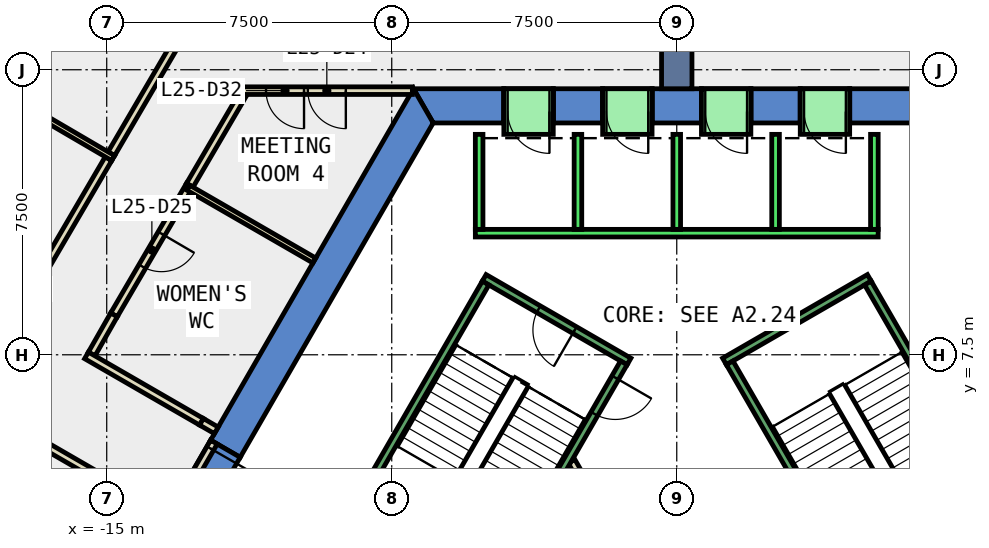
"""IFC4 building model, lengths in metres.
Left out: names, types, materials, properties, quantities, classifications, styles, units other than length and angle.
Written with IfcOpenShell. Run it as: python <this file> out.ifc"""

import sys

from ifc_helpers import new_model, si_unit, direction, frame, frame_2d, origin, place, context, subcontext, project, spatial, polyline, rectangle, outline, extrude, element, fill, save


model = new_model("IFC4")
c1 = context("Model", 3, precision=1e-05, world=origin(), true_north=direction((0.0, 1.0)))
c2 = subcontext(c1, "Body", "Model", "MODEL_VIEW")
j1 = project(units=[si_unit("LENGTHUNIT", "METRE"), si_unit("PLANEANGLEUNIT", "RADIAN")], contexts=[c1])
p1 = place(None, origin())
s1 = spatial("IfcSite", under=j1, at=p1, CompositionType="ELEMENT")
p2 = place(p1, origin())
s2 = spatial("IfcBuilding", under=s1, at=p2, CompositionType="ELEMENT")
p3 = place(p2, frame((0.0, 0.0, 116.0)))
s3 = spatial("IfcBuildingStorey", under=s2, at=p3, CompositionType="ELEMENT", Elevation=116.0)
p4 = place(p3, frame((0.0, 0.0, -0.4)))
e1 = element("IfcWall", 1, at=p4, inside=s3, PredefinedType="SHEAR", context=c2, shape_type="SweptSolid", body=[
    extrude(outline(polyline([(4.55, 14.5), (4.55, 13.6), (6.409, 13.6), (6.928, 14.5), (4.55, 14.5)])), origin(), (0.0, 0.0, 1.0), 4.2),
])
p5 = place(p3, frame((0.0, 0.0, -0.4)))
e2 = element("IfcWall", 2, at=p5, inside=s3, PredefinedType="SHEAR", context=c2, shape_type="SweptSolid", body=[
    extrude(outline(polyline([(1.95, 14.5), (1.95, 13.6), (3.25, 13.6), (3.25, 14.5), (1.95, 14.5)])), origin(), (0.0, 0.0, 1.0), 4.2),
])
p6 = place(p3, frame((0.0, 0.0, -0.4)))
e3 = element("IfcWall", 3, at=p6, inside=s3, PredefinedType="SHEAR", context=c2, shape_type="SweptSolid", body=[
    extrude(outline(polyline([(-0.65, 14.5), (-0.65, 13.6), (0.65, 13.6), (0.65, 14.5), (-0.65, 14.5)])), origin(), (0.0, 0.0, 1.0), 4.2),
])
p7 = place(p3, frame((0.0, 0.0, -0.4)))
e4 = element("IfcWall", 4, at=p7, inside=s3, PredefinedType="SHEAR", context=c2, shape_type="SweptSolid", body=[
    extrude(outline(polyline([(-3.25, 14.5), (-3.25, 13.6), (-1.95, 13.6), (-1.95, 14.5), (-3.25, 14.5)])), origin(), (0.0, 0.0, 1.0), 4.2),
])
p8 = place(p3, frame((0.0, 0.0, -0.4)))
e5 = element("IfcWall", 5, at=p8, inside=s3, PredefinedType="SHEAR", context=c2, shape_type="SweptSolid", body=[
    extrude(outline(polyline([(-4.55, 13.6), (-4.55, 14.5), (-6.928, 14.5), (-6.409, 13.6), (-4.55, 13.6)])), origin(), (0.0, 0.0, 1.0), 4.2),
])
p9 = place(p3, frame((0.0, 0.0, 3.6)))
e6 = element("IfcWall", 6, at=p9, inside=s3, PredefinedType="SHEAR", context=c2, shape_type="SweptSolid", body=[
    extrude(outline(polyline([(3.25, 14.5), (3.25, 13.6), (4.55, 13.6), (4.55, 14.5), (3.25, 14.5)])), origin(), (0.0, 0.0, 1.0), 0.2),
])
p10 = place(p3, frame((0.0, 0.0, 3.6)))
e7 = element("IfcWall", 7, at=p10, inside=s3, PredefinedType="SHEAR", context=c2, shape_type="SweptSolid", body=[
    extrude(outline(polyline([(0.65, 14.5), (0.65, 13.6), (1.95, 13.6), (1.95, 14.5), (0.65, 14.5)])), origin(), (0.0, 0.0, 1.0), 0.2),
])
p11 = place(p3, frame((0.0, 0.0, 3.6)))
e8 = element("IfcWall", 8, at=p11, inside=s3, PredefinedType="SHEAR", context=c2, shape_type="SweptSolid", body=[
    extrude(outline(polyline([(-1.95, 14.5), (-1.95, 13.6), (-0.65, 13.6), (-0.65, 14.5), (-1.95, 14.5)])), origin(), (0.0, 0.0, 1.0), 0.2),
])
p12 = place(p3, frame((0.0, 0.0, 3.6)))
e9 = element("IfcWall", 9, at=p12, inside=s3, PredefinedType="SHEAR", context=c2, shape_type="SweptSolid", body=[
    extrude(outline(polyline([(-4.55, 14.5), (-4.55, 13.6), (-3.25, 13.6), (-3.25, 14.5), (-4.55, 14.5)])), origin(), (0.0, 0.0, 1.0), 0.2),
])
p13 = place(p3, frame((0.0, 0.0, -0.4)))
e10 = element("IfcWall", 10, at=p13, inside=s3, PredefinedType="SHEAR", context=c2, shape_type="SweptSolid", body=[
    extrude(outline(polyline([(-12.267, 5.252), (-11.488, 4.802), (-6.409, 13.6), (-6.928, 14.5), (-12.267, 5.252)])), origin(), (0.0, 0.0, 1.0), 4.2),
])
p14 = place(p3, frame((0.0, 0.0, 3.6)))
e11 = element("IfcWall", 11, at=p14, inside=s3, PredefinedType="SHEAR", context=c2, shape_type="SweptSolid", body=[
    extrude(outline(polyline([(-13.267, 3.52), (-12.488, 3.07), (-11.488, 4.802), (-12.267, 5.252), (-13.267, 3.52)])), origin(), (0.0, 0.0, 1.0), 0.2),
])
p15 = place(p3, frame((0.0, 14.5, -0.4), z_axis=(0.0, 0.0, 1.0), x_axis=(0.0, 1.0, 0.0)))
e12 = element("IfcWall", 12, at=p15, inside=s3, PredefinedType="SHEAR", context=c2, shape_type="SweptSolid", body=[
    extrude(rectangle(XDim=9.0, YDim=0.8, at=frame_2d((4.5, 0.0))), origin(), (0.0, 0.0, 1.0), 4.2),
])
p16 = place(p3, frame((-11.409, 14.364, 0.0), z_axis=(0.0, 0.0, 1.0), x_axis=(-0.504846343003, -0.863209227219, 0.0)))
e13 = element("IfcWall", 13, at=p16, inside=s3, PredefinedType="PARTITIONING", context=c2, shape_type="SweptSolid", body=[
    extrude(rectangle(XDim=2.785, YDim=0.2, at=frame_2d((1.393, 0.0))), origin(), (0.0, 0.0, 1.0), 3.8),
])
p17 = place(p3, frame((-12.815, 11.96, 0.0), z_axis=(0.0, 0.0, 1.0), x_axis=(-0.5048198861, -0.863224699946, 0.0)))
e14 = element("IfcWall", 14, at=p17, inside=s3, PredefinedType="PARTITIONING", context=c2, shape_type="SweptSolid", body=[
    extrude(rectangle(XDim=3.95, YDim=0.2, at=frame_2d((1.975, 0.0))), origin(), (0.0, 0.0, 1.0), 3.8),
])
p18 = place(p17, frame((1.475, 0.0, 0.0)))
e15 = element("IfcOpeningElement", 15, at=p18, cuts=e14, PredefinedType="OPENING", context=c2, shape_type="SweptSolid", body=[
    extrude(rectangle(XDim=1.0, YDim=2.1, at=frame_2d((0.5, 1.05))), frame((0.0, 0.11, 0.0), z_axis=(0.0, -1.0, 0.0), x_axis=(1.0, 0.0, 0.0)), (0.0, 0.0, 1.0), 0.22),
])
p19 = place(p3, frame((-14.809, 8.55, 0.0), z_axis=(0.0, 0.0, 1.0), x_axis=(-0.495074026382, -0.868850797549, 0.0)))
e16 = element("IfcWall", 16, at=p19, inside=s3, PredefinedType="PARTITIONING", context=c2, shape_type="SweptSolid", body=[
    extrude(rectangle(XDim=1.186, YDim=0.2, at=frame_2d((0.593, 0.0))), origin(), (0.0, 0.0, 1.0), 3.8),
])
p20 = place(p3, frame((-15.532, 7.484, 0.0), z_axis=(0.0, 0.0, 1.0), x_axis=(0.866045954906, -0.499964402723, 0.0)))
e17 = element("IfcWall", 17, at=p20, inside=s3, PredefinedType="PARTITIONING", context=c2, shape_type="SweptSolid", body=[
    extrude(rectangle(XDim=3.494, YDim=0.2, at=frame_2d((1.747, 0.0))), origin(), (0.0, 0.0, 1.0), 3.8),
])
p21 = place(p3, frame((-14.879, 12.789, 0.0), z_axis=(0.0, 0.0, 1.0), x_axis=(0.504763220102, 0.863257836126, 0.0)))
e18 = element("IfcWall", 18, at=p21, inside=s3, PredefinedType="PARTITIONING", context=c2, shape_type="SweptSolid", body=[
    extrude(rectangle(XDim=3.487, YDim=0.2, at=frame_2d((1.743, 0.0))), origin(), (0.0, 0.0, 1.0), 3.8),
])
p22 = place(p3, frame((-16.714, 9.65, 0.0), z_axis=(0.0, 0.0, 1.0), x_axis=(0.504885284202, 0.863186451351, 0.0)))
e19 = element("IfcWall", 19, at=p22, inside=s3, PredefinedType="PARTITIONING", context=c2, shape_type="SweptSolid", body=[
    extrude(rectangle(XDim=3.486, YDim=0.2, at=frame_2d((1.743, 0.0))), origin(), (0.0, 0.0, 1.0), 3.8),
])
p23 = place(p3, frame((-9.537, 9.981, 0.0), z_axis=(0.0, 0.0, 1.0), x_axis=(-0.866068787954, 0.499924848885, 0.0)))
e20 = element("IfcWall", 20, at=p23, inside=s3, PredefinedType="PARTITIONING", context=c2, shape_type="SweptSolid", body=[
    extrude(rectangle(XDim=3.829, YDim=0.15, at=frame_2d((1.914, 0.0))), origin(), (0.0, 0.0, 1.0), 3.8),
])
p24 = place(p3, frame((-6.957, 14.45, 0.0), z_axis=(0.0, 0.0, 1.0), x_axis=(-1.0, 0.0, 0.0)))
e21 = element("IfcWall", 21, at=p24, inside=s3, PredefinedType="PARTITIONING", context=c2, shape_type="SweptSolid", body=[
    extrude(rectangle(XDim=4.502, YDim=0.2, at=frame_2d((2.251, 0.0))), origin(), (0.0, 0.0, 1.0), 3.8),
])
p25 = place(p24, frame((1.751, 0.0, 0.0)))
e22 = element("IfcOpeningElement", 22, at=p25, cuts=e21, PredefinedType="OPENING", context=c2, shape_type="SweptSolid", body=[
    extrude(rectangle(XDim=1.0, YDim=2.1, at=frame_2d((0.5, 1.05))), frame((0.0, 0.11, 0.0), z_axis=(0.0, -1.0, 0.0), x_axis=(1.0, 0.0, 0.0)), (0.0, 0.0, 1.0), 0.22),
])
p26 = place(p24, frame((2.851, 0.0, 0.0)))
e23 = element("IfcOpeningElement", 23, at=p26, cuts=e21, PredefinedType="OPENING", context=c2, shape_type="SweptSolid", body=[
    extrude(rectangle(XDim=1.0, YDim=2.1, at=frame_2d((0.5, 1.05))), frame((0.0, 0.11, 0.0), z_axis=(0.0, -1.0, 0.0), x_axis=(1.0, 0.0, 0.0)), (0.0, 0.0, 1.0), 0.22),
])
p27 = place(p3, frame((-2.771, 4.7, 0.0), z_axis=(0.0, 0.0, 1.0), x_axis=(0.499969479948, -0.866043023828, 0.0)))
e24 = element("IfcWall", 24, at=p27, inside=s3, PredefinedType="PARTITIONING", context=c2, shape_type="SweptSolid", body=[
    extrude(rectangle(XDim=4.99, YDim=0.2, at=frame_2d((2.495, 0.0))), origin(), (0.0, 0.0, 1.0), 3.8),
])
p28 = place(p27, frame((1.945, 0.0, 0.0)))
e25 = element("IfcOpeningElement", 25, at=p28, cuts=e24, PredefinedType="OPENING", context=c2, shape_type="SweptSolid", body=[
    extrude(rectangle(XDim=1.0, YDim=2.1, at=frame_2d((0.5, 1.05))), frame((0.0, 0.11, 0.0), z_axis=(0.0, -1.0, 0.0), x_axis=(1.0, 0.0, 0.0)), (0.0, 0.0, 1.0), 0.22),
])
p29 = place(p3, frame((-14.83, 12.674, 0.0), z_axis=(0.0, 0.0, 1.0), x_axis=(-0.863237916953, 0.504797284794, 0.0)))
e26 = element("IfcWall", 26, at=p29, inside=s3, PredefinedType="PARTITIONING", context=c2, shape_type="SweptSolid", body=[
    extrude(rectangle(XDim=7.7, YDim=0.15, at=frame_2d((3.85, 0.0))), origin(), (0.0, 0.0, 1.0), 3.8),
])
p30 = place(p3, frame((-12.18, 5.202, 0.0), z_axis=(0.0, 0.0, 1.0), x_axis=(-0.50002537861, -0.866010750942, 0.0)))
e27 = element("IfcWall", 27, at=p30, inside=s3, PredefinedType="PARTITIONING", context=c2, shape_type="SweptSolid", body=[
    extrude(rectangle(XDim=2.0, YDim=0.2, at=frame_2d((1.0, 0.0))), origin(), (0.0, 0.0, 1.0), 2.4),
])
p31 = place(p30, frame((0.19, 0.0, 0.0)))
e28 = element("IfcOpeningElement", 28, at=p31, cuts=e27, PredefinedType="OPENING", context=c2, shape_type="SweptSolid", body=[
    extrude(rectangle(XDim=1.8, YDim=2.1, at=frame_2d((0.9, 1.05))), frame((0.0, 0.11, 0.0), z_axis=(0.0, -1.0, 0.0), x_axis=(1.0, 0.0, 0.0)), (0.0, 0.0, 1.0), 0.22),
])
p32 = place(p3, frame((-12.506, 5.737, 0.0), z_axis=(0.0, 0.0, 1.0), x_axis=(0.865624510465, -0.500693725627, 0.0)))
e29 = element("IfcWall", 29, at=p32, inside=s3, PredefinedType="PARTITIONING", context=c2, shape_type="SweptSolid", body=[
    extrude(rectangle(XDim=0.449, YDim=0.2, at=frame_2d((0.225, 0.0))), origin(), (0.0, 0.0, 1.0), 2.4),
])
p33 = place(p3, frame((-13.807, 3.485, 0.0), z_axis=(0.0, 0.0, 1.0), x_axis=(-0.865984597717, 0.500070671522, 0.0)))
e30 = element("IfcWall", 30, at=p33, inside=s3, PredefinedType="PARTITIONING", context=c2, shape_type="SweptSolid", body=[
    extrude(rectangle(XDim=3.479, YDim=0.2, at=frame_2d((1.74, 0.0))), origin(), (0.0, 0.0, 1.0), 3.8),
])
p34 = place(p3, frame((5.3, 10.7, 0.0), z_axis=(0.0, 0.0, 1.0), x_axis=(-1.0, 0.0, 0.0)))
e31 = element("IfcWall", 31, at=p34, inside=s3, PredefinedType="STANDARD", context=c2, shape_type="SweptSolid", body=[
    extrude(rectangle(XDim=10.6, YDim=0.2, at=frame_2d((5.3, 0.0))), origin(), (0.0, 0.0, 1.0), 3.8),
])
for number, where, z_axis, x_axis in (
    (32, (5.2, 10.8, 0.0), (0.0, 0.0, 1.0), (0.0, 1.0, 0.0)),
    (33, (2.6, 10.8, 0.0), (0.0, 0.0, 1.0), (0.0, 1.0, 0.0)),
    (34, (0.0, 10.8, 0.0), (0.0, 0.0, 1.0), (0.0, 1.0, 0.0)),
    (35, (-2.6, 10.8, 0.0), (0.0, 0.0, 1.0), (0.0, 1.0, 0.0)),
    (36, (-5.2, 10.8, 0.0), (0.0, 0.0, 1.0), (0.0, 1.0, 0.0)),
):
    element("IfcWall", number, at=place(p3, frame(where, z_axis=z_axis, x_axis=x_axis)), inside=s3, PredefinedType="STANDARD", context=c2, shape_type="SweptSolid", body=[
        extrude(rectangle(XDim=2.5, YDim=0.2, at=frame_2d((1.25, 0.0))), origin(), (0.0, 0.0, 1.0), 3.8),
    ])
p35 = place(p3, frame((4.55, 13.9, 0.0), z_axis=(0.0, 0.0, 1.0), x_axis=(-1.0, 0.0, 0.0)))
e37 = element("IfcWall", 37, at=p35, inside=s3, PredefinedType="STANDARD", context=c2, shape_type="SweptSolid", body=[
    extrude(rectangle(XDim=1.3, YDim=1.2, at=frame_2d((0.65, 0.0))), origin(), (0.0, 0.0, 1.0), 2.4),
])
p36 = place(p35, frame((0.1, 0.0, 0.0)))
e38 = element("IfcOpeningElement", 38, at=p36, cuts=e37, PredefinedType="OPENING", context=c2, shape_type="SweptSolid", body=[
    extrude(rectangle(XDim=1.1, YDim=2.3, at=frame_2d((0.55, 1.15))), frame((0.0, 0.61, 0.0), z_axis=(0.0, -1.0, 0.0), x_axis=(1.0, 0.0, 0.0)), (0.0, 0.0, 1.0), 1.22),
])
p37 = place(p3, frame((1.95, 13.9, 0.0), z_axis=(0.0, 0.0, 1.0), x_axis=(-1.0, 0.0, 0.0)))
e39 = element("IfcWall", 39, at=p37, inside=s3, PredefinedType="STANDARD", context=c2, shape_type="SweptSolid", body=[
    extrude(rectangle(XDim=1.3, YDim=1.2, at=frame_2d((0.65, 0.0))), origin(), (0.0, 0.0, 1.0), 2.4),
])
p38 = place(p37, frame((0.1, 0.0, 0.0)))
e40 = element("IfcOpeningElement", 40, at=p38, cuts=e39, PredefinedType="OPENING", context=c2, shape_type="SweptSolid", body=[
    extrude(rectangle(XDim=1.1, YDim=2.3, at=frame_2d((0.55, 1.15))), frame((0.0, 0.61, 0.0), z_axis=(0.0, -1.0, 0.0), x_axis=(1.0, 0.0, 0.0)), (0.0, 0.0, 1.0), 1.22),
])
p39 = place(p3, frame((-0.65, 13.9, 0.0), z_axis=(0.0, 0.0, 1.0), x_axis=(-1.0, 0.0, 0.0)))
e41 = element("IfcWall", 41, at=p39, inside=s3, PredefinedType="STANDARD", context=c2, shape_type="SweptSolid", body=[
    extrude(rectangle(XDim=1.3, YDim=1.2, at=frame_2d((0.65, 0.0))), origin(), (0.0, 0.0, 1.0), 2.4),
])
p40 = place(p39, frame((0.1, 0.0, 0.0)))
e42 = element("IfcOpeningElement", 42, at=p40, cuts=e41, PredefinedType="OPENING", context=c2, shape_type="SweptSolid", body=[
    extrude(rectangle(XDim=1.1, YDim=2.3, at=frame_2d((0.55, 1.15))), frame((0.0, 0.61, 0.0), z_axis=(0.0, -1.0, 0.0), x_axis=(1.0, 0.0, 0.0)), (0.0, 0.0, 1.0), 1.22),
])
p41 = place(p3, frame((-3.25, 13.9, 0.0), z_axis=(0.0, 0.0, 1.0), x_axis=(-1.0, 0.0, 0.0)))
e43 = element("IfcWall", 43, at=p41, inside=s3, PredefinedType="STANDARD", context=c2, shape_type="SweptSolid", body=[
    extrude(rectangle(XDim=1.3, YDim=1.2, at=frame_2d((0.65, 0.0))), origin(), (0.0, 0.0, 1.0), 2.4),
])
p42 = place(p41, frame((0.1, 0.0, 0.0)))
e44 = element("IfcOpeningElement", 44, at=p42, cuts=e43, PredefinedType="OPENING", context=c2, shape_type="SweptSolid", body=[
    extrude(rectangle(XDim=1.1, YDim=2.3, at=frame_2d((0.55, 1.15))), frame((0.0, 0.61, 0.0), z_axis=(0.0, -1.0, 0.0), x_axis=(1.0, 0.0, 0.0)), (0.0, 0.0, 1.0), 1.22),
])
p43 = place(p3, frame((1.256, 7.324, 0.0), z_axis=(0.0, 0.0, 1.0), x_axis=(0.866046073146, 0.499964197906, 0.0)))
e45 = element("IfcWall", 45, at=p43, inside=s3, PredefinedType="STANDARD", context=c2, shape_type="SweptSolid", body=[
    extrude(rectangle(XDim=4.4, YDim=0.2, at=frame_2d((2.2, 0.0))), origin(), (0.0, 0.0, 1.0), 3.8),
])
p44 = place(p3, frame((4.843, 1.312, 0.0), z_axis=(0.0, 0.0, 1.0), x_axis=(-0.499963383562, 0.866046543262, 0.0)))
e46 = element("IfcWall", 46, at=p44, inside=s3, PredefinedType="STANDARD", context=c2, shape_type="SweptSolid", body=[
    extrude(rectangle(XDim=6.9, YDim=0.2, at=frame_2d((3.45, 0.0))), origin(), (0.0, 0.0, 1.0), 3.8),
])
p45 = place(p44, frame((0.45, 0.0, 0.0)))
e47 = element("IfcOpeningElement", 47, at=p45, cuts=e46, PredefinedType="OPENING", context=c2, shape_type="SweptSolid", body=[
    extrude(rectangle(XDim=1.1, YDim=2.2, at=frame_2d((0.55, 1.1))), frame((0.0, 0.11, 0.0), z_axis=(0.0, -1.0, 0.0), x_axis=(1.0, 0.0, 0.0)), (0.0, 0.0, 1.0), 0.22),
])
p46 = place(p3, frame((8.48, 3.412, 0.0), z_axis=(0.0, 0.0, 1.0), x_axis=(-0.499978703459, 0.866037698999, 0.0)))
e48 = element("IfcWall", 48, at=p46, inside=s3, PredefinedType="STANDARD", context=c2, shape_type="SweptSolid", body=[
    extrude(rectangle(XDim=6.9, YDim=0.2, at=frame_2d((3.45, 0.0))), origin(), (0.0, 0.0, 1.0), 3.8),
])
p47 = place(p3, frame((-1.256, 7.324, 0.0), z_axis=(0.0, 0.0, 1.0), x_axis=(-0.866046073146, 0.499964197906, 0.0)))
e49 = element("IfcWall", 49, at=p47, inside=s3, PredefinedType="STANDARD", context=c2, shape_type="SweptSolid", body=[
    extrude(rectangle(XDim=4.4, YDim=0.2, at=frame_2d((2.2, 0.0))), origin(), (0.0, 0.0, 1.0), 3.8),
])
p48 = place(p47, frame((1.65, 0.0, 0.0)))
e50 = element("IfcOpeningElement", 50, at=p48, cuts=e49, PredefinedType="OPENING", context=c2, shape_type="SweptSolid", body=[
    extrude(rectangle(XDim=1.1, YDim=2.2, at=frame_2d((0.55, 1.1))), frame((0.0, 0.11, 0.0), z_axis=(0.0, -1.0, 0.0), x_axis=(1.0, 0.0, 0.0)), (0.0, 0.0, 1.0), 0.22),
])
p49 = place(p3, frame((-1.393, 7.288, 0.0), z_axis=(0.0, 0.0, 1.0), x_axis=(-0.499963383562, -0.866046543262, 0.0)))
e51 = element("IfcWall", 51, at=p49, inside=s3, PredefinedType="STANDARD", context=c2, shape_type="SweptSolid", body=[
    extrude(rectangle(XDim=6.9, YDim=0.2, at=frame_2d((3.45, 0.0))), origin(), (0.0, 0.0, 1.0), 3.8),
])
p50 = place(p49, frame((0.45, 0.0, 0.0)))
e52 = element("IfcOpeningElement", 52, at=p50, cuts=e51, PredefinedType="OPENING", context=c2, shape_type="SweptSolid", body=[
    extrude(rectangle(XDim=1.1, YDim=2.2, at=frame_2d((0.55, 1.1))), frame((0.0, 0.11, 0.0), z_axis=(0.0, -1.0, 0.0), x_axis=(1.0, 0.0, 0.0)), (0.0, 0.0, 1.0), 0.22),
])
p51 = place(p3, frame((-5.03, 9.388, 0.0), z_axis=(0.0, 0.0, 1.0), x_axis=(-0.499978703459, -0.866037698999, 0.0)))
e53 = element("IfcWall", 53, at=p51, inside=s3, PredefinedType="STANDARD", context=c2, shape_type="SweptSolid", body=[
    extrude(rectangle(XDim=6.9, YDim=0.2, at=frame_2d((3.45, 0.0))), origin(), (0.0, 0.0, 1.0), 3.8),
])
p52 = place(p25, origin())
e54 = element("IfcDoor", 54, at=p52, inside=s3, OperationType="SINGLE_SWING_LEFT", PredefinedType="DOOR", context=c2, shape_type="SweptSolid", body=[
    extrude(rectangle(XDim=1.0, YDim=2.1, at=frame_2d((0.5, 1.05))), frame((0.0, 0.025, 0.0), z_axis=(0.0, -1.0, 0.0), x_axis=(1.0, 0.0, 0.0)), (0.0, 0.0, 1.0), 0.05),
])
fill(e22, e54)
p53 = place(p18, origin())
e55 = element("IfcDoor", 55, at=p53, inside=s3, OperationType="SINGLE_SWING_RIGHT", PredefinedType="DOOR", context=c2, shape_type="SweptSolid", body=[
    extrude(rectangle(XDim=1.0, YDim=2.1, at=frame_2d((0.5, 1.05))), frame((0.0, 0.025, 0.0), z_axis=(0.0, -1.0, 0.0), x_axis=(1.0, 0.0, 0.0)), (0.0, 0.0, 1.0), 0.05),
])
fill(e15, e55)
p54 = place(p26, origin())
e56 = element("IfcDoor", 56, at=p54, inside=s3, OperationType="SINGLE_SWING_RIGHT", PredefinedType="DOOR", context=c2, shape_type="SweptSolid", body=[
    extrude(rectangle(XDim=1.0, YDim=2.1, at=frame_2d((0.5, 1.05))), frame((0.0, 0.025, 0.0), z_axis=(0.0, -1.0, 0.0), x_axis=(1.0, 0.0, 0.0)), (0.0, 0.0, 1.0), 0.05),
])
fill(e23, e56)
p55 = place(p31, origin())
e57 = element("IfcDoor", 57, at=p55, inside=s3, OperationType="DOUBLE_DOOR_SINGLE_SWING", PredefinedType="DOOR", context=c2, shape_type="SweptSolid", body=[
    extrude(rectangle(XDim=1.8, YDim=2.1, at=frame_2d((0.9, 1.05))), frame((0.0, 0.025, 0.0), z_axis=(0.0, -1.0, 0.0), x_axis=(1.0, 0.0, 0.0)), (0.0, 0.0, 1.0), 0.05),
])
fill(e28, e57)
p56 = place(p36, origin())
e58 = element("IfcDoor", 58, at=p56, inside=s3, OperationType="SLIDING_TO_LEFT", PredefinedType="DOOR", context=c2, shape_type="SweptSolid", body=[
    extrude(rectangle(XDim=1.1, YDim=2.3, at=frame_2d((0.55, 1.15))), frame((0.0, 0.025, 0.0), z_axis=(0.0, -1.0, 0.0), x_axis=(1.0, 0.0, 0.0)), (0.0, 0.0, 1.0), 0.05),
])
fill(e38, e58)
p57 = place(p38, origin())
e59 = element("IfcDoor", 59, at=p57, inside=s3, OperationType="SLIDING_TO_LEFT", PredefinedType="DOOR", context=c2, shape_type="SweptSolid", body=[
    extrude(rectangle(XDim=1.1, YDim=2.3, at=frame_2d((0.55, 1.15))), frame((0.0, 0.025, 0.0), z_axis=(0.0, -1.0, 0.0), x_axis=(1.0, 0.0, 0.0)), (0.0, 0.0, 1.0), 0.05),
])
fill(e40, e59)
p58 = place(p40, origin())
e60 = element("IfcDoor", 60, at=p58, inside=s3, OperationType="SLIDING_TO_LEFT", PredefinedType="DOOR", context=c2, shape_type="SweptSolid", body=[
    extrude(rectangle(XDim=1.1, YDim=2.3, at=frame_2d((0.55, 1.15))), frame((0.0, 0.025, 0.0), z_axis=(0.0, -1.0, 0.0), x_axis=(1.0, 0.0, 0.0)), (0.0, 0.0, 1.0), 0.05),
])
fill(e42, e60)
p59 = place(p42, origin())
e61 = element("IfcDoor", 61, at=p59, inside=s3, OperationType="SLIDING_TO_LEFT", PredefinedType="DOOR", context=c2, shape_type="SweptSolid", body=[
    extrude(rectangle(XDim=1.1, YDim=2.3, at=frame_2d((0.55, 1.15))), frame((0.0, 0.025, 0.0), z_axis=(0.0, -1.0, 0.0), x_axis=(1.0, 0.0, 0.0)), (0.0, 0.0, 1.0), 0.05),
])
fill(e44, e61)
p60 = place(p50, origin())
e62 = element("IfcDoor", 62, at=p60, inside=s3, OperationType="SINGLE_SWING_LEFT", PredefinedType="DOOR", context=c2, shape_type="SweptSolid", body=[
    extrude(rectangle(XDim=1.1, YDim=2.2, at=frame_2d((0.55, 1.1))), frame((0.0, 0.025, 0.0), z_axis=(0.0, -1.0, 0.0), x_axis=(1.0, 0.0, 0.0)), (0.0, 0.0, 1.0), 0.05),
])
fill(e52, e62)
p61 = place(p48, origin())
e63 = element("IfcDoor", 63, at=p61, inside=s3, OperationType="SINGLE_SWING_LEFT", PredefinedType="DOOR", context=c2, shape_type="SweptSolid", body=[
    extrude(rectangle(XDim=1.1, YDim=2.2, at=frame_2d((0.55, 1.1))), frame((0.0, 0.025, 0.0), z_axis=(0.0, -1.0, 0.0), x_axis=(1.0, 0.0, 0.0)), (0.0, 0.0, 1.0), 0.05),
])
fill(e50, e63)
save(model, sys.argv[1])
